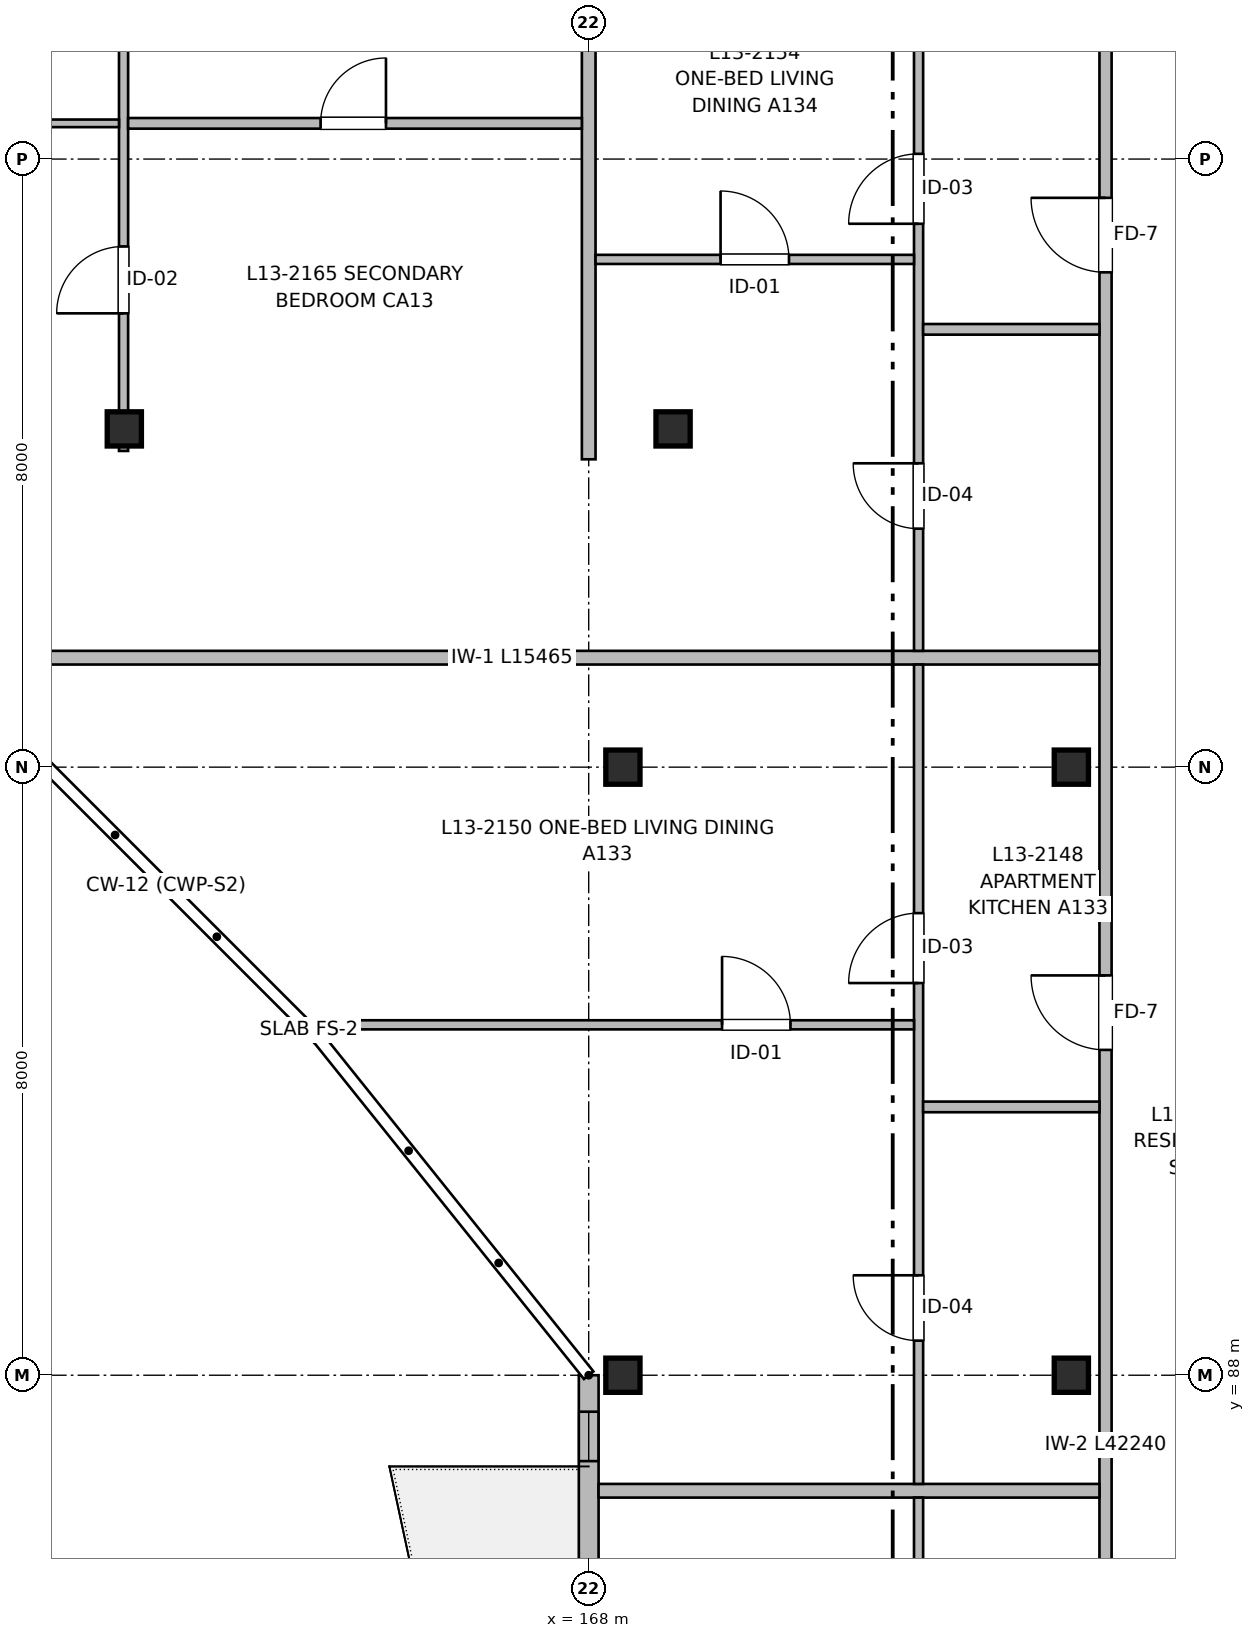
"""IFC4 building model, lengths in metres.
Left out: names, types, materials, properties, quantities, classifications, styles, units other than length and angle.
Written with IfcOpenShell. Run it as: python <this file> out.ifc"""

import sys

from ifc_helpers import new_model, si_unit, direction, frame, frame_2d, origin, origin_2d, place, context, subcontext, project, spatial, rectangle, extrude, element, fill, save


model = new_model("IFC4")
c1 = context("Model", 3, precision=1e-05, world=origin(), true_north=direction((0.0, 1.0)))
c2 = subcontext(c1, "Body", "Model", "MODEL_VIEW")
j1 = project(units=[si_unit("LENGTHUNIT", "METRE"), si_unit("PLANEANGLEUNIT", "RADIAN")], contexts=[c1])
p1 = place(None, origin())
s1 = spatial("IfcSite", under=j1, at=p1, CompositionType="ELEMENT")
p2 = place(p1, origin())
s2 = spatial("IfcBuilding", under=s1, at=p2, CompositionType="ELEMENT")
p3 = place(p2, frame((0.0, 0.0, 42.56)))
s3 = spatial("IfcBuildingStorey", under=s2, at=p3, CompositionType="ELEMENT", Elevation=42.56)
for number, where, z_axis, x_axis in (
    (1, (161.89, 100.45, 0.0), (0.0, 0.0, 1.0), (1.0, 0.0, 0.0)),
    (2, (168.45, 88.0, 0.0), (0.0, 0.0, 1.0), (1.0, 0.0, 0.0)),
    (3, (168.45, 96.0, 0.0), (0.0, 0.0, 1.0), (1.0, 0.0, 0.0)),
    (4, (169.11, 100.45, 0.0), (0.0, 0.0, 1.0), (1.0, 0.0, 0.0)),
    (5, (174.35, 88.0, 0.0), (0.0, 0.0, 1.0), (1.0, 0.0, 0.0)),
    (6, (174.35, 96.0, 0.0), (0.0, 0.0, 1.0), (1.0, 0.0, 0.0)),
):
    element("IfcColumn", number, at=place(p3, frame(where, z_axis=z_axis, x_axis=x_axis)), inside=s3, PredefinedType="COLUMN", context=c2, shape_type="SweptSolid", body=[
        extrude(rectangle(XDim=0.45, YDim=0.45, at=origin_2d()), origin(), (0.0, 0.0, 1.0), 3.2),
    ])
p4 = place(p3, frame((168.0, 64.4, 0.0), z_axis=(0.0, 0.0, 1.0), x_axis=(0.0, 1.0, 0.0)))
e7 = element("IfcWall", 7, at=p4, inside=s3, PredefinedType="SOLIDWALL", context=c2, shape_type="SweptSolid", body=[
    extrude(rectangle(XDim=23.6, YDim=0.26, at=frame_2d((11.8, 0.0))), origin(), (0.0, 0.0, 1.0), 2.98),
])
p5 = place(p4, frame((4.0, 0.0, 0.0)))
e8 = element("IfcOpeningElement", 8, at=p5, cuts=e7, PredefinedType="OPENING", context=c2, shape_type="SweptSolid", body=[
    extrude(rectangle(XDim=1.2, YDim=2.2, at=frame_2d((0.6, 1.1))), frame((0.0, 0.14, 0.0), z_axis=(0.0, -1.0, 0.0), x_axis=(1.0, 0.0, 0.0)), (0.0, 0.0, 1.0), 0.28),
])
p6 = place(p4, frame((7.2, 0.0, 0.9)))
e9 = element("IfcOpeningElement", 9, at=p6, cuts=e7, PredefinedType="OPENING", context=c2, shape_type="SweptSolid", body=[
    extrude(rectangle(XDim=0.65, YDim=0.95, at=frame_2d((0.325, 0.475))), frame((0.0, 0.14, 0.0), z_axis=(0.0, -1.0, 0.0), x_axis=(1.0, 0.0, 0.0)), (0.0, 0.0, 1.0), 0.28),
])
p7 = place(p4, frame((17.425, 0.0, 0.77)))
e10 = element("IfcOpeningElement", 10, at=p7, cuts=e7, PredefinedType="OPENING", context=c2, shape_type="SweptSolid", body=[
    extrude(rectangle(XDim=1.45, YDim=1.45, at=frame_2d((0.725, 0.725))), frame((0.0, 0.14, 0.0), z_axis=(0.0, -1.0, 0.0), x_axis=(1.0, 0.0, 0.0)), (0.0, 0.0, 1.0), 0.28),
])
p8 = place(p4, frame((12.85, 0.0, 0.82)))
e11 = element("IfcOpeningElement", 11, at=p8, cuts=e7, PredefinedType="OPENING", context=c2, shape_type="SweptSolid", body=[
    extrude(rectangle(XDim=1.5, YDim=1.4, at=frame_2d((0.75, 0.7))), frame((0.0, 0.14, 0.0), z_axis=(0.0, -1.0, 0.0), x_axis=(1.0, 0.0, 0.0)), (0.0, 0.0, 1.0), 0.28),
])
p9 = place(p4, frame((22.47, 0.0, 0.9)))
e12 = element("IfcOpeningElement", 12, at=p9, cuts=e7, PredefinedType="OPENING", context=c2, shape_type="SweptSolid", body=[
    extrude(rectangle(XDim=0.65, YDim=0.95, at=frame_2d((0.325, 0.475))), frame((0.0, 0.14, 0.0), z_axis=(0.0, -1.0, 0.0), x_axis=(1.0, 0.0, 0.0)), (0.0, 0.0, 1.0), 0.28),
])
p10 = place(p3, frame((174.8, 64.56, 0.0), z_axis=(0.0, 0.0, 1.0), x_axis=(0.0, 1.0, 0.0)))
e13 = element("IfcWall", 13, at=p10, inside=s3, PredefinedType="PARTITIONING", context=c2, shape_type="SweptSolid", body=[
    extrude(rectangle(XDim=42.24, YDim=0.16, at=frame_2d((21.12, 0.0))), origin(), (0.0, 0.0, 1.0), 2.935),
])
p11 = place(p10, frame((5.36, 0.0, 0.0)))
e14 = element("IfcOpeningElement", 14, at=p11, cuts=e13, PredefinedType="OPENING", context=c2, shape_type="SweptSolid", body=[
    extrude(rectangle(XDim=0.98, YDim=2.15, at=frame_2d((0.49, 1.075))), frame((0.0, 0.09, 0.0), z_axis=(0.0, -1.0, 0.0), x_axis=(1.0, 0.0, 0.0)), (0.0, 0.0, 1.0), 0.18),
])
p12 = place(p10, frame((16.31, 0.0, 0.0)))
e15 = element("IfcOpeningElement", 15, at=p12, cuts=e13, PredefinedType="OPENING", context=c2, shape_type="SweptSolid", body=[
    extrude(rectangle(XDim=1.02, YDim=2.15, at=frame_2d((0.51, 1.075))), frame((0.0, 0.09, 0.0), z_axis=(0.0, -1.0, 0.0), x_axis=(1.0, 0.0, 0.0)), (0.0, 0.0, 1.0), 0.18),
])
p13 = place(p10, frame((27.72, 0.0, 0.0)))
e16 = element("IfcOpeningElement", 16, at=p13, cuts=e13, PredefinedType="OPENING", context=c2, shape_type="SweptSolid", body=[
    extrude(rectangle(XDim=0.98, YDim=2.15, at=frame_2d((0.49, 1.075))), frame((0.0, 0.09, 0.0), z_axis=(0.0, -1.0, 0.0), x_axis=(1.0, 0.0, 0.0)), (0.0, 0.0, 1.0), 0.18),
])
p14 = place(p10, frame((37.95, 0.0, 0.0)))
e17 = element("IfcOpeningElement", 17, at=p14, cuts=e13, PredefinedType="OPENING", context=c2, shape_type="SweptSolid", body=[
    extrude(rectangle(XDim=0.98, YDim=2.15, at=frame_2d((0.49, 1.075))), frame((0.0, 0.09, 0.0), z_axis=(0.0, -1.0, 0.0), x_axis=(1.0, 0.0, 0.0)), (0.0, 0.0, 1.0), 0.18),
])
p15 = place(p3, frame((168.0, 100.05, 0.0), z_axis=(0.0, 0.0, 1.0), x_axis=(0.0, 1.0, 0.0)))
e18 = element("IfcWall", 18, at=p15, inside=s3, PredefinedType="PARTITIONING", context=c2, shape_type="SweptSolid", body=[
    extrude(rectangle(XDim=6.67, YDim=0.18, at=frame_2d((3.335, 0.0))), origin(), (0.0, 0.0, 1.0), 2.935),
])
p16 = place(p3, frame((168.13, 86.48, 0.0), z_axis=(0.0, 0.0, 1.0), x_axis=(1.0, 0.0, 0.0)))
e19 = element("IfcWall", 19, at=p16, inside=s3, PredefinedType="PARTITIONING", context=c2, shape_type="SweptSolid", body=[
    extrude(rectangle(XDim=6.59, YDim=0.18, at=frame_2d((3.295, 0.0))), origin(), (0.0, 0.0, 1.0), 2.935),
])
p17 = place(p3, frame((159.255, 97.44, 0.0), z_axis=(0.0, 0.0, 1.0), x_axis=(1.0, 0.0, 0.0)))
e20 = element("IfcWall", 20, at=p17, inside=s3, PredefinedType="PARTITIONING", context=c2, shape_type="SweptSolid", body=[
    extrude(rectangle(XDim=15.465, YDim=0.18, at=frame_2d((7.732, 0.0))), origin(), (0.0, 0.0, 1.0), 2.935),
])
p18 = place(p3, frame((172.34, 74.77, 0.0), z_axis=(0.0, 0.0, 1.0), x_axis=(0.0, 1.0, 0.0)))
e21 = element("IfcWall", 21, at=p18, inside=s3, PredefinedType="PARTITIONING", context=c2, shape_type="SweptSolid", body=[
    extrude(rectangle(XDim=11.62, YDim=0.12, at=frame_2d((5.81, 0.0))), origin(), (0.0, 0.0, 1.0), 2.935),
])
p19 = place(p18, frame((2.033, 0.0, 0.0)))
e22 = element("IfcOpeningElement", 22, at=p19, cuts=e21, PredefinedType="OPENING", context=c2, shape_type="SweptSolid", body=[
    extrude(rectangle(XDim=0.94, YDim=2.1, at=frame_2d((0.47, 1.05))), frame((0.0, 0.07, 0.0), z_axis=(0.0, -1.0, 0.0), x_axis=(1.0, 0.0, 0.0)), (0.0, 0.0, 1.0), 0.14),
])
p20 = place(p18, frame((7.106, 0.0, 0.0)))
e23 = element("IfcOpeningElement", 23, at=p20, cuts=e21, PredefinedType="OPENING", context=c2, shape_type="SweptSolid", body=[
    extrude(rectangle(XDim=0.92, YDim=2.1, at=frame_2d((0.46, 1.05))), frame((0.0, 0.07, 0.0), z_axis=(0.0, -1.0, 0.0), x_axis=(1.0, 0.0, 0.0)), (0.0, 0.0, 1.0), 0.14),
])
p21 = place(p3, frame((172.34, 86.57, 0.0), z_axis=(0.0, 0.0, 1.0), x_axis=(0.0, 1.0, 0.0)))
e24 = element("IfcWall", 24, at=p21, inside=s3, PredefinedType="PARTITIONING", context=c2, shape_type="SweptSolid", body=[
    extrude(rectangle(XDim=10.78, YDim=0.12, at=frame_2d((5.39, 0.0))), origin(), (0.0, 0.0, 1.0), 2.935),
])
p22 = place(p21, frame((1.885, 0.0, 0.0)))
e25 = element("IfcOpeningElement", 25, at=p22, cuts=e24, PredefinedType="OPENING", context=c2, shape_type="SweptSolid", body=[
    extrude(rectangle(XDim=0.86, YDim=2.1, at=frame_2d((0.43, 1.05))), frame((0.0, 0.07, 0.0), z_axis=(0.0, -1.0, 0.0), x_axis=(1.0, 0.0, 0.0)), (0.0, 0.0, 1.0), 0.14),
])
p23 = place(p21, frame((6.59, 0.0, 0.0)))
e26 = element("IfcOpeningElement", 26, at=p23, cuts=e24, PredefinedType="OPENING", context=c2, shape_type="SweptSolid", body=[
    extrude(rectangle(XDim=0.92, YDim=2.1, at=frame_2d((0.46, 1.05))), frame((0.0, 0.07, 0.0), z_axis=(0.0, -1.0, 0.0), x_axis=(1.0, 0.0, 0.0)), (0.0, 0.0, 1.0), 0.14),
])
p24 = place(p3, frame((172.4, 91.53, 0.0), z_axis=(0.0, 0.0, 1.0), x_axis=(1.0, 0.0, 0.0)))
e27 = element("IfcWall", 27, at=p24, inside=s3, PredefinedType="PARTITIONING", context=c2, shape_type="SweptSolid", body=[
    extrude(rectangle(XDim=2.32, YDim=0.14, at=frame_2d((1.16, 0.0))), origin(), (0.0, 0.0, 1.0), 2.935),
])
p25 = place(p3, frame((164.323, 92.61, 0.0), z_axis=(0.0, 0.0, 1.0), x_axis=(1.0, 0.0, 0.0)))
e28 = element("IfcWall", 28, at=p25, inside=s3, PredefinedType="PARTITIONING", context=c2, shape_type="SweptSolid", body=[
    extrude(rectangle(XDim=7.958, YDim=0.12, at=frame_2d((3.979, 0.0))), origin(), (0.0, 0.0, 1.0), 2.935),
])
p26 = place(p25, frame((5.432, 0.0, 0.0)))
e29 = element("IfcOpeningElement", 29, at=p26, cuts=e28, PredefinedType="OPENING", context=c2, shape_type="SweptSolid", body=[
    extrude(rectangle(XDim=0.9, YDim=2.1, at=frame_2d((0.45, 1.05))), frame((0.0, 0.07, 0.0), z_axis=(0.0, -1.0, 0.0), x_axis=(1.0, 0.0, 0.0)), (0.0, 0.0, 1.0), 0.14),
])
p27 = place(p3, frame((172.34, 97.53, 0.0), z_axis=(0.0, 0.0, 1.0), x_axis=(0.0, 1.0, 0.0)))
e30 = element("IfcWall", 30, at=p27, inside=s3, PredefinedType="PARTITIONING", context=c2, shape_type="SweptSolid", body=[
    extrude(rectangle(XDim=9.19, YDim=0.12, at=frame_2d((4.595, 0.0))), origin(), (0.0, 0.0, 1.0), 2.935),
])
p28 = place(p27, frame((1.607, 0.0, 0.0)))
e31 = element("IfcOpeningElement", 31, at=p28, cuts=e30, PredefinedType="OPENING", context=c2, shape_type="SweptSolid", body=[
    extrude(rectangle(XDim=0.86, YDim=2.1, at=frame_2d((0.43, 1.05))), frame((0.0, 0.07, 0.0), z_axis=(0.0, -1.0, 0.0), x_axis=(1.0, 0.0, 0.0)), (0.0, 0.0, 1.0), 0.14),
])
p29 = place(p27, frame((5.619, 0.0, 0.0)))
e32 = element("IfcOpeningElement", 32, at=p29, cuts=e30, PredefinedType="OPENING", context=c2, shape_type="SweptSolid", body=[
    extrude(rectangle(XDim=0.92, YDim=2.1, at=frame_2d((0.46, 1.05))), frame((0.0, 0.07, 0.0), z_axis=(0.0, -1.0, 0.0), x_axis=(1.0, 0.0, 0.0)), (0.0, 0.0, 1.0), 0.14),
])
p30 = place(p3, frame((172.4, 101.76, 0.0), z_axis=(0.0, 0.0, 1.0), x_axis=(1.0, 0.0, 0.0)))
e33 = element("IfcWall", 33, at=p30, inside=s3, PredefinedType="PARTITIONING", context=c2, shape_type="SweptSolid", body=[
    extrude(rectangle(XDim=2.32, YDim=0.14, at=frame_2d((1.16, 0.0))), origin(), (0.0, 0.0, 1.0), 2.935),
])
p31 = place(p3, frame((168.09, 102.68, 0.0), z_axis=(0.0, 0.0, 1.0), x_axis=(1.0, 0.0, 0.0)))
e34 = element("IfcWall", 34, at=p31, inside=s3, PredefinedType="PARTITIONING", context=c2, shape_type="SweptSolid", body=[
    extrude(rectangle(XDim=4.19, YDim=0.12, at=frame_2d((2.095, 0.0))), origin(), (0.0, 0.0, 1.0), 2.935),
])
p32 = place(p31, frame((1.645, 0.0, 0.0)))
e35 = element("IfcOpeningElement", 35, at=p32, cuts=e34, PredefinedType="OPENING", context=c2, shape_type="SweptSolid", body=[
    extrude(rectangle(XDim=0.9, YDim=2.1, at=frame_2d((0.45, 1.05))), frame((0.0, 0.07, 0.0), z_axis=(0.0, -1.0, 0.0), x_axis=(1.0, 0.0, 0.0)), (0.0, 0.0, 1.0), 0.14),
])
p33 = place(p3, frame((161.88, 100.16, 0.0), z_axis=(0.0, 0.0, 1.0), x_axis=(0.0, 1.0, 0.0)))
e36 = element("IfcWall", 36, at=p33, inside=s3, PredefinedType="PARTITIONING", context=c2, shape_type="SweptSolid", body=[
    extrude(rectangle(XDim=6.56, YDim=0.12, at=frame_2d((3.28, 0.0))), origin(), (0.0, 0.0, 1.0), 2.68),
])
p34 = place(p33, frame((1.81, 0.0, 0.0)))
e37 = element("IfcOpeningElement", 37, at=p34, cuts=e36, PredefinedType="OPENING", context=c2, shape_type="SweptSolid", body=[
    extrude(rectangle(XDim=0.88, YDim=2.1, at=frame_2d((0.44, 1.05))), frame((0.0, 0.07, 0.0), z_axis=(0.0, -1.0, 0.0), x_axis=(1.0, 0.0, 0.0)), (0.0, 0.0, 1.0), 0.14),
])
p35 = place(p3, frame((161.94, 104.47, 0.0), z_axis=(0.0, 0.0, 1.0), x_axis=(1.0, 0.0, 0.0)))
e38 = element("IfcWall", 38, at=p35, inside=s3, PredefinedType="PARTITIONING", context=c2, shape_type="SweptSolid", body=[
    extrude(rectangle(XDim=5.97, YDim=0.14, at=frame_2d((2.985, 0.0))), origin(), (0.0, 0.0, 1.0), 2.935),
])
p36 = place(p35, frame((2.533, 0.0, 0.0)))
e39 = element("IfcOpeningElement", 39, at=p36, cuts=e38, PredefinedType="OPENING", context=c2, shape_type="SweptSolid", body=[
    extrude(rectangle(XDim=0.86, YDim=2.1, at=frame_2d((0.43, 1.05))), frame((0.0, 0.08, 0.0), z_axis=(0.0, -1.0, 0.0), x_axis=(1.0, 0.0, 0.0)), (0.0, 0.0, 1.0), 0.16),
])
p37 = place(p3, frame((154.8, 104.47, 0.0), z_axis=(0.0, 0.0, 1.0), x_axis=(1.0, 0.0, 0.0)))
e40 = element("IfcWall", 40, at=p37, inside=s3, PredefinedType="PARTITIONING", context=c2, shape_type="SweptSolid", body=[
    extrude(rectangle(XDim=7.02, YDim=0.1, at=frame_2d((3.51, 0.0))), origin(), (0.0, 0.0, 1.0), 2.935),
])
p38 = place(p37, frame((2.974, 0.0, 0.0)))
e41 = element("IfcOpeningElement", 41, at=p38, cuts=e40, PredefinedType="OPENING", context=c2, shape_type="SweptSolid", body=[
    extrude(rectangle(XDim=0.92, YDim=2.1, at=frame_2d((0.46, 1.05))), frame((0.0, 0.06, 0.0), z_axis=(0.0, -1.0, 0.0), x_axis=(1.0, 0.0, 0.0)), (0.0, 0.0, 1.0), 0.12),
])
p39 = place(p22, origin())
e42 = element("IfcDoor", 42, at=p39, inside=s3, OperationType="SINGLE_SWING_RIGHT", PredefinedType="DOOR", context=c2, shape_type="SweptSolid", body=[
    extrude(rectangle(XDim=0.86, YDim=2.1, at=frame_2d((0.43, 1.05))), frame((0.0, 0.025, 0.0), z_axis=(0.0, -1.0, 0.0), x_axis=(1.0, 0.0, 0.0)), (0.0, 0.0, 1.0), 0.05),
])
fill(e25, e42)
p40 = place(p23, origin())
e43 = element("IfcDoor", 43, at=p40, inside=s3, OperationType="SINGLE_SWING_LEFT", PredefinedType="DOOR", context=c2, shape_type="SweptSolid", body=[
    extrude(rectangle(XDim=0.92, YDim=2.1, at=frame_2d((0.46, 1.05))), frame((0.0, 0.025, 0.0), z_axis=(0.0, -1.0, 0.0), x_axis=(1.0, 0.0, 0.0)), (0.0, 0.0, 1.0), 0.05),
])
fill(e26, e43)
p41 = place(p13, origin())
e44 = element("IfcDoor", 44, at=p41, inside=s3, OperationType="SINGLE_SWING_RIGHT", PredefinedType="DOOR", context=c2, shape_type="SweptSolid", body=[
    extrude(rectangle(XDim=0.98, YDim=2.15, at=frame_2d((0.49, 1.075))), frame((0.0, 0.025, 0.0), z_axis=(0.0, -1.0, 0.0), x_axis=(1.0, 0.0, 0.0)), (0.0, 0.0, 1.0), 0.05),
])
fill(e16, e44)
p42 = place(p26, origin())
e45 = element("IfcDoor", 45, at=p42, inside=s3, OperationType="SINGLE_SWING_LEFT", PredefinedType="DOOR", context=c2, shape_type="SweptSolid", body=[
    extrude(rectangle(XDim=0.9, YDim=2.1, at=frame_2d((0.45, 1.05))), frame((0.0, 0.025, 0.0), z_axis=(0.0, -1.0, 0.0), x_axis=(1.0, 0.0, 0.0)), (0.0, 0.0, 1.0), 0.05),
])
fill(e29, e45)
p43 = place(p28, origin())
e46 = element("IfcDoor", 46, at=p43, inside=s3, OperationType="SINGLE_SWING_RIGHT", PredefinedType="DOOR", context=c2, shape_type="SweptSolid", body=[
    extrude(rectangle(XDim=0.86, YDim=2.1, at=frame_2d((0.43, 1.05))), frame((0.0, 0.025, 0.0), z_axis=(0.0, -1.0, 0.0), x_axis=(1.0, 0.0, 0.0)), (0.0, 0.0, 1.0), 0.05),
])
fill(e31, e46)
p44 = place(p29, origin())
e47 = element("IfcDoor", 47, at=p44, inside=s3, OperationType="SINGLE_SWING_LEFT", PredefinedType="DOOR", context=c2, shape_type="SweptSolid", body=[
    extrude(rectangle(XDim=0.92, YDim=2.1, at=frame_2d((0.46, 1.05))), frame((0.0, 0.025, 0.0), z_axis=(0.0, -1.0, 0.0), x_axis=(1.0, 0.0, 0.0)), (0.0, 0.0, 1.0), 0.05),
])
fill(e32, e47)
p45 = place(p14, origin())
e48 = element("IfcDoor", 48, at=p45, inside=s3, OperationType="SINGLE_SWING_RIGHT", PredefinedType="DOOR", context=c2, shape_type="SweptSolid", body=[
    extrude(rectangle(XDim=0.98, YDim=2.15, at=frame_2d((0.49, 1.075))), frame((0.0, 0.025, 0.0), z_axis=(0.0, -1.0, 0.0), x_axis=(1.0, 0.0, 0.0)), (0.0, 0.0, 1.0), 0.05),
])
fill(e17, e48)
p46 = place(p32, origin())
e49 = element("IfcDoor", 49, at=p46, inside=s3, OperationType="SINGLE_SWING_LEFT", PredefinedType="DOOR", context=c2, shape_type="SweptSolid", body=[
    extrude(rectangle(XDim=0.9, YDim=2.1, at=frame_2d((0.45, 1.05))), frame((0.0, 0.025, 0.0), z_axis=(0.0, -1.0, 0.0), x_axis=(1.0, 0.0, 0.0)), (0.0, 0.0, 1.0), 0.05),
])
fill(e35, e49)
p47 = place(p34, origin())
e50 = element("IfcDoor", 50, at=p47, inside=s3, OperationType="SINGLE_SWING_LEFT", PredefinedType="DOOR", context=c2, shape_type="SweptSolid", body=[
    extrude(rectangle(XDim=0.88, YDim=2.1, at=frame_2d((0.44, 1.05))), frame((0.0, 0.025, 0.0), z_axis=(0.0, -1.0, 0.0), x_axis=(1.0, 0.0, 0.0)), (0.0, 0.0, 1.0), 0.05),
])
fill(e37, e50)
p48 = place(p36, origin())
e51 = element("IfcDoor", 51, at=p48, inside=s3, OperationType="SINGLE_SWING_RIGHT", PredefinedType="DOOR", context=c2, shape_type="SweptSolid", body=[
    extrude(rectangle(XDim=0.86, YDim=2.1, at=frame_2d((0.43, 1.05))), frame((0.0, 0.025, 0.0), z_axis=(0.0, -1.0, 0.0), x_axis=(1.0, 0.0, 0.0)), (0.0, 0.0, 1.0), 0.05),
])
fill(e39, e51)
p49 = place(p9, origin())
e52 = element("IfcWindow", 52, at=p49, inside=s3, PartitioningType="SINGLE_PANEL", PredefinedType="WINDOW", context=c2, shape_type="SweptSolid", body=[
    extrude(rectangle(XDim=0.65, YDim=0.95, at=frame_2d((0.325, 0.475))), frame((0.0, 0.03, 0.0), z_axis=(0.0, -1.0, 0.0), x_axis=(1.0, 0.0, 0.0)), (0.0, 0.0, 1.0), 0.06),
])
fill(e12, e52)
save(model, sys.argv[1])
